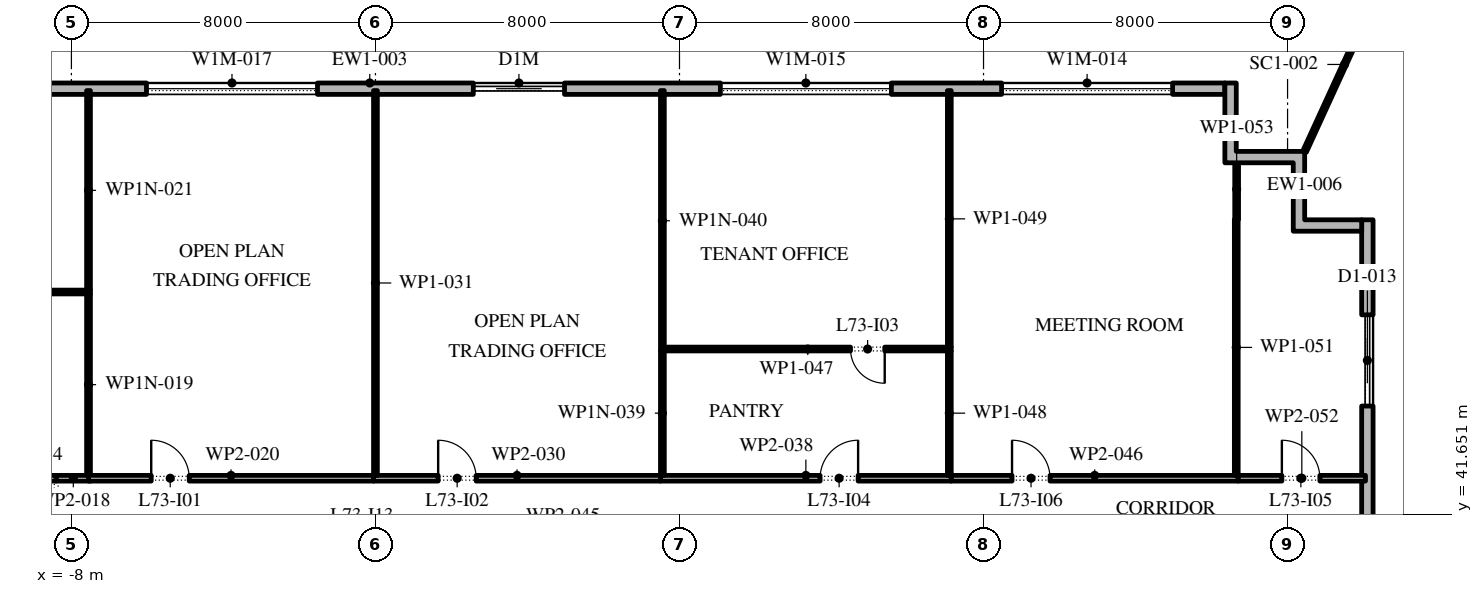
"""IFC4 building model, lengths in metres.
Left out: names, types, materials, properties, quantities, classifications, styles, units other than length and angle.
Written with IfcOpenShell. Run it as: python <this file> out.ifc"""

import sys

from ifc_helpers import new_model, si_unit, direction, frame, frame_2d, origin, place, context, subcontext, project, spatial, polyline, rectangle, outline, extrude, element, fill, save


model = new_model("IFC4")
c1 = context("Model", 3, precision=1e-05, world=origin(), true_north=direction((0.0, 1.0)))
c2 = subcontext(c1, "Body", "Model", "MODEL_VIEW")
j1 = project(units=[si_unit("LENGTHUNIT", "METRE"), si_unit("PLANEANGLEUNIT", "RADIAN")], contexts=[c1])
p1 = place(None, origin())
s1 = spatial("IfcSite", under=j1, at=p1, CompositionType="ELEMENT")
p2 = place(p1, origin())
s2 = spatial("IfcBuilding", under=s1, at=p2, CompositionType="ELEMENT")
p3 = place(p2, frame((0.0, 0.0, 334.2)))
s3 = spatial("IfcBuildingStorey", under=s2, at=p3, CompositionType="ELEMENT", Elevation=334.2)
p4 = place(p3, frame((26.1, -2.1, 0.0), z_axis=(0.0, 0.0, 1.0), x_axis=(0.0, 1.0, 0.0)))
e1 = element("IfcWall", 1, at=p4, inside=s3, PredefinedType="STANDARD", context=c2, shape_type="SweptSolid", body=[
    extrude(rectangle(XDim=51.5, YDim=0.3, at=frame_2d((25.75, 0.0))), origin(), (0.0, 0.0, 1.0), 4.0),
])
p5 = place(p4, frame((1.3, 0.0, 0.45)))
e2 = element("IfcOpeningElement", 2, at=p5, cuts=e1, PredefinedType="OPENING", context=c2, shape_type="SweptSolid", body=[
    extrude(rectangle(XDim=4.5, YDim=3.05, at=frame_2d((2.25, 1.525))), frame((0.0, 0.16, 0.0), z_axis=(0.0, -1.0, 0.0), x_axis=(1.0, 0.0, 0.0)), (0.0, 0.0, 1.0), 0.32),
])
p6 = place(p4, frame((8.55, 0.0, 0.45)))
e3 = element("IfcOpeningElement", 3, at=p6, cuts=e1, PredefinedType="OPENING", context=c2, shape_type="SweptSolid", body=[
    extrude(rectangle(XDim=4.5, YDim=3.05, at=frame_2d((2.25, 1.525))), frame((0.0, 0.16, 0.0), z_axis=(0.0, -1.0, 0.0), x_axis=(1.0, 0.0, 0.0)), (0.0, 0.0, 1.0), 0.32),
])
p7 = place(p4, frame((17.0, 0.0, 0.0)))
e4 = element("IfcOpeningElement", 4, at=p7, cuts=e1, PredefinedType="OPENING", context=c2, shape_type="SweptSolid", body=[
    extrude(rectangle(XDim=2.4, YDim=3.5, at=frame_2d((1.2, 1.75))), frame((0.0, 0.16, 0.0), z_axis=(0.0, -1.0, 0.0), x_axis=(1.0, 0.0, 0.0)), (0.0, 0.0, 1.0), 0.32),
])
p8 = place(p4, frame((23.35, 0.0, 0.45)))
e5 = element("IfcOpeningElement", 5, at=p8, cuts=e1, PredefinedType="OPENING", context=c2, shape_type="SweptSolid", body=[
    extrude(rectangle(XDim=4.5, YDim=3.05, at=frame_2d((2.25, 1.525))), frame((0.0, 0.16, 0.0), z_axis=(0.0, -1.0, 0.0), x_axis=(1.0, 0.0, 0.0)), (0.0, 0.0, 1.0), 0.32),
])
p9 = place(p4, frame((30.75, 0.0, 0.45)))
e6 = element("IfcOpeningElement", 6, at=p9, cuts=e1, PredefinedType="OPENING", context=c2, shape_type="SweptSolid", body=[
    extrude(rectangle(XDim=4.5, YDim=3.05, at=frame_2d((2.25, 1.525))), frame((0.0, 0.16, 0.0), z_axis=(0.0, -1.0, 0.0), x_axis=(1.0, 0.0, 0.0)), (0.0, 0.0, 1.0), 0.32),
])
p10 = place(p4, frame((38.15, 0.0, 0.45)))
e7 = element("IfcOpeningElement", 7, at=p10, cuts=e1, PredefinedType="OPENING", context=c2, shape_type="SweptSolid", body=[
    extrude(rectangle(XDim=4.5, YDim=3.05, at=frame_2d((2.25, 1.525))), frame((0.0, 0.16, 0.0), z_axis=(0.0, -1.0, 0.0), x_axis=(1.0, 0.0, 0.0)), (0.0, 0.0, 1.0), 0.32),
])
p11 = place(p4, frame((46.6, 0.0, 0.0)))
e8 = element("IfcOpeningElement", 8, at=p11, cuts=e1, PredefinedType="OPENING", context=c2, shape_type="SweptSolid", body=[
    extrude(rectangle(XDim=2.4, YDim=3.5, at=frame_2d((1.2, 1.75))), frame((0.0, 0.16, 0.0), z_axis=(0.0, -1.0, 0.0), x_axis=(1.0, 0.0, 0.0)), (0.0, 0.0, 1.0), 0.32),
])
p12 = place(p3, frame((22.35, 52.85, 0.0), z_axis=(0.0, 0.0, 1.0), x_axis=(-1.0, 0.0, 0.0)))
e9 = element("IfcWall", 9, at=p12, inside=s3, PredefinedType="STANDARD", context=c2, shape_type="SweptSolid", body=[
    extrude(rectangle(XDim=45.0, YDim=0.3, at=frame_2d((22.5, 0.0))), origin(), (0.0, 0.0, 1.0), 4.0),
])
p13 = place(p12, frame((1.375, 0.0, 0.45)))
e10 = element("IfcOpeningElement", 10, at=p13, cuts=e9, PredefinedType="OPENING", context=c2, shape_type="SweptSolid", body=[
    extrude(rectangle(XDim=4.5, YDim=2.575, at=frame_2d((2.25, 1.288))), frame((0.0, 0.16, 0.0), z_axis=(0.0, -1.0, 0.0), x_axis=(1.0, 0.0, 0.0)), (0.0, 0.0, 1.0), 0.32),
])
p14 = place(p12, frame((8.775, 0.0, 0.45)))
e11 = element("IfcOpeningElement", 11, at=p14, cuts=e9, PredefinedType="OPENING", context=c2, shape_type="SweptSolid", body=[
    extrude(rectangle(XDim=4.5, YDim=2.575, at=frame_2d((2.25, 1.288))), frame((0.0, 0.16, 0.0), z_axis=(0.0, -1.0, 0.0), x_axis=(1.0, 0.0, 0.0)), (0.0, 0.0, 1.0), 0.32),
])
p15 = place(p12, frame((17.375, 0.0, 0.0)))
e12 = element("IfcOpeningElement", 12, at=p15, cuts=e9, PredefinedType="OPENING", context=c2, shape_type="SweptSolid", body=[
    extrude(rectangle(XDim=2.4, YDim=3.025, at=frame_2d((1.2, 1.512))), frame((0.0, 0.16, 0.0), z_axis=(0.0, -1.0, 0.0), x_axis=(1.0, 0.0, 0.0)), (0.0, 0.0, 1.0), 0.32),
])
p16 = place(p12, frame((23.875, 0.0, 0.45)))
e13 = element("IfcOpeningElement", 13, at=p16, cuts=e9, PredefinedType="OPENING", context=c2, shape_type="SweptSolid", body=[
    extrude(rectangle(XDim=4.5, YDim=2.575, at=frame_2d((2.25, 1.288))), frame((0.0, 0.16, 0.0), z_axis=(0.0, -1.0, 0.0), x_axis=(1.0, 0.0, 0.0)), (0.0, 0.0, 1.0), 0.32),
])
p17 = place(p12, frame((31.425, 0.0, 0.45)))
e14 = element("IfcOpeningElement", 14, at=p17, cuts=e9, PredefinedType="OPENING", context=c2, shape_type="SweptSolid", body=[
    extrude(rectangle(XDim=4.5, YDim=2.575, at=frame_2d((2.25, 1.288))), frame((0.0, 0.16, 0.0), z_axis=(0.0, -1.0, 0.0), x_axis=(1.0, 0.0, 0.0)), (0.0, 0.0, 1.0), 0.32),
])
p18 = place(p12, frame((38.975, 0.0, 0.45)))
e15 = element("IfcOpeningElement", 15, at=p18, cuts=e9, PredefinedType="OPENING", context=c2, shape_type="SweptSolid", body=[
    extrude(rectangle(XDim=4.5, YDim=2.575, at=frame_2d((2.25, 1.288))), frame((0.0, 0.16, 0.0), z_axis=(0.0, -1.0, 0.0), x_axis=(1.0, 0.0, 0.0)), (0.0, 0.0, 1.0), 0.32),
])
p19 = place(p3, origin())
e16 = element("IfcWall", 16, at=p19, inside=s3, PredefinedType="STANDARD", context=c2, shape_type="SweptSolid", body=[
    extrude(outline(polyline([(24.15, 50.9), (22.35, 50.9), (22.35, 53.0), (22.65, 53.0), (22.65, 51.2), (24.45, 51.2), (24.45, 49.4), (25.95, 49.4), (25.95, 49.1), (24.15, 49.1), (24.15, 50.9)])), origin(), (0.0, 0.0, 1.0), 4.0),
])
p20 = place(p3, frame((24.45, 51.2, -0.05), z_axis=(0.0, 0.0, 1.0), x_axis=(0.41666974254, 0.909057933056, 0.0)))
e17 = element("IfcWall", 17, at=p20, inside=s3, PredefinedType="STANDARD", context=c2, shape_type="SweptSolid", body=[
    extrude(rectangle(XDim=5.033, YDim=0.1, at=frame_2d((2.517, 0.0))), origin(), (0.0, 0.0, 1.0), 4.05),
])
p21 = place(p3, frame((-15.05, 47.5, 0.0), z_axis=(0.0, 0.0, 1.0), x_axis=(1.0, 0.0, 0.0)))
e18 = element("IfcWall", 18, at=p21, inside=s3, PredefinedType="PARTITIONING", context=c2, shape_type="SweptSolid", body=[
    extrude(rectangle(XDim=7.55, YDim=0.1, at=frame_2d((3.775, 0.0))), origin(), (0.0, 0.0, 1.0), 4.0),
])
p22 = place(p21, frame((4.9, 0.0, 0.0)))
e19 = element("IfcOpeningElement", 19, at=p22, cuts=e18, PredefinedType="OPENING", context=c2, shape_type="SweptSolid", body=[
    extrude(rectangle(XDim=0.9, YDim=2.1, at=frame_2d((0.45, 1.05))), frame((0.0, 0.06, 0.0), z_axis=(0.0, -1.0, 0.0), x_axis=(1.0, 0.0, 0.0)), (0.0, 0.0, 1.0), 0.12),
])
p23 = place(p3, frame((-10.0, 42.6, 0.0), z_axis=(0.0, 0.0, 1.0), x_axis=(1.0, 0.0, 0.0)))
e20 = element("IfcWall", 20, at=p23, inside=s3, PredefinedType="PARTITIONING", context=c2, shape_type="SweptSolid", body=[
    extrude(rectangle(XDim=1.6, YDim=0.15, at=frame_2d((0.8, 0.0))), origin(), (0.0, 0.0, 1.0), 4.0),
])
p24 = place(p3, frame((-8.4, 42.6, 0.0), z_axis=(0.0, 0.0, 1.0), x_axis=(1.0, 0.0, 0.0)))
e21 = element("IfcWall", 21, at=p24, inside=s3, PredefinedType="PARTITIONING", context=c2, shape_type="SweptSolid", body=[
    extrude(rectangle(XDim=0.9, YDim=0.15, at=frame_2d((0.45, 0.0))), origin(), (0.0, 0.0, 1.0), 4.0),
])
p25 = place(p3, frame((-7.55, 42.675, 0.0), z_axis=(0.0, 0.0, 1.0), x_axis=(0.0, 1.0, 0.0)))
e22 = element("IfcWall", 22, at=p25, inside=s3, PredefinedType="PARTITIONING", context=c2, shape_type="SweptSolid", body=[
    extrude(rectangle(XDim=4.775, YDim=0.1, at=frame_2d((2.387, 0.0))), origin(), (0.0, 0.0, 1.0), 3.164),
])
p26 = place(p3, frame((-7.55, 42.6, 0.0), z_axis=(0.0, 0.0, 1.0), x_axis=(1.0, 0.0, 0.0)))
e23 = element("IfcWall", 23, at=p26, inside=s3, PredefinedType="PARTITIONING", context=c2, shape_type="SweptSolid", body=[
    extrude(rectangle(XDim=7.5, YDim=0.15, at=frame_2d((3.75, 0.0))), origin(), (0.0, 0.0, 1.0), 4.0),
])
p27 = place(p26, frame((1.65, 0.0, 0.0)))
e24 = element("IfcOpeningElement", 24, at=p27, cuts=e23, PredefinedType="OPENING", context=c2, shape_type="SweptSolid", body=[
    extrude(rectangle(XDim=1.0, YDim=2.1, at=frame_2d((0.5, 1.05))), frame((0.0, 0.085, 0.0), z_axis=(0.0, -1.0, 0.0), x_axis=(1.0, 0.0, 0.0)), (0.0, 0.0, 1.0), 0.17),
])
p28 = place(p3, frame((-7.55, 47.55, 0.0), z_axis=(0.0, 0.0, 1.0), x_axis=(0.0, 1.0, 0.0)))
e25 = element("IfcWall", 25, at=p28, inside=s3, PredefinedType="PARTITIONING", context=c2, shape_type="SweptSolid", body=[
    extrude(rectangle(XDim=5.25, YDim=0.1, at=frame_2d((2.625, 0.0))), origin(), (0.0, 0.0, 1.0), 3.164),
])
p29 = place(p3, frame((-0.05, 42.6, 0.0), z_axis=(0.0, 0.0, 1.0), x_axis=(1.0, 0.0, 0.0)))
e26 = element("IfcWall", 26, at=p29, inside=s3, PredefinedType="PARTITIONING", context=c2, shape_type="SweptSolid", body=[
    extrude(rectangle(XDim=7.55, YDim=0.15, at=frame_2d((3.775, 0.0))), origin(), (0.0, 0.0, 1.0), 4.0),
])
p30 = place(p29, frame((1.7, 0.0, 0.0)))
e27 = element("IfcOpeningElement", 27, at=p30, cuts=e26, PredefinedType="OPENING", context=c2, shape_type="SweptSolid", body=[
    extrude(rectangle(XDim=1.0, YDim=2.1, at=frame_2d((0.5, 1.05))), frame((0.0, 0.085, 0.0), z_axis=(0.0, -1.0, 0.0), x_axis=(1.0, 0.0, 0.0)), (0.0, 0.0, 1.0), 0.17),
])
p31 = place(p3, frame((0.0, 52.8, 0.0), z_axis=(0.0, 0.0, 1.0), x_axis=(0.0, -1.0, 0.0)))
e28 = element("IfcWall", 28, at=p31, inside=s3, PredefinedType="PARTITIONING", context=c2, shape_type="SweptSolid", body=[
    extrude(rectangle(XDim=10.125, YDim=0.1, at=frame_2d((5.062, 0.0))), origin(), (0.0, 0.0, 1.0), 4.0),
])
p32 = place(p3, frame((7.5, 42.6, 0.0), z_axis=(0.0, 0.0, 1.0), x_axis=(1.0, 0.0, 0.0)))
e29 = element("IfcWall", 29, at=p32, inside=s3, PredefinedType="PARTITIONING", context=c2, shape_type="SweptSolid", body=[
    extrude(rectangle(XDim=7.65, YDim=0.15, at=frame_2d((3.825, 0.0))), origin(), (0.0, 0.0, 1.0), 4.0),
])
p33 = place(p32, frame((4.2, 0.0, 0.0)))
e30 = element("IfcOpeningElement", 30, at=p33, cuts=e29, PredefinedType="OPENING", context=c2, shape_type="SweptSolid", body=[
    extrude(rectangle(XDim=1.0, YDim=2.1, at=frame_2d((0.5, 1.05))), frame((0.0, 0.085, 0.0), z_axis=(0.0, -1.0, 0.0), x_axis=(1.0, 0.0, 0.0)), (0.0, 0.0, 1.0), 0.17),
])
p34 = place(p3, frame((7.55, 45.95, 0.0), z_axis=(0.0, 0.0, 1.0), x_axis=(0.0, -1.0, 0.0)))
e31 = element("IfcWall", 31, at=p34, inside=s3, PredefinedType="PARTITIONING", context=c2, shape_type="SweptSolid", body=[
    extrude(rectangle(XDim=3.275, YDim=0.1, at=frame_2d((1.637, 0.0))), origin(), (0.0, 0.0, 1.0), 3.164),
])
p35 = place(p3, frame((7.55, 52.8, 0.0), z_axis=(0.0, 0.0, 1.0), x_axis=(0.0, -1.0, 0.0)))
e32 = element("IfcWall", 32, at=p35, inside=s3, PredefinedType="PARTITIONING", context=c2, shape_type="SweptSolid", body=[
    extrude(rectangle(XDim=6.85, YDim=0.1, at=frame_2d((3.425, 0.0))), origin(), (0.0, 0.0, 1.0), 3.164),
])
p36 = place(p3, frame((15.15, 42.6, 0.0), z_axis=(0.0, 0.0, 1.0), x_axis=(1.0, 0.0, 0.0)))
e33 = element("IfcWall", 33, at=p36, inside=s3, PredefinedType="PARTITIONING", context=c2, shape_type="SweptSolid", body=[
    extrude(rectangle(XDim=7.55, YDim=0.15, at=frame_2d((3.775, 0.0))), origin(), (0.0, 0.0, 1.0), 4.0),
])
p37 = place(p36, frame((1.6, 0.0, 0.0)))
e34 = element("IfcOpeningElement", 34, at=p37, cuts=e33, PredefinedType="OPENING", context=c2, shape_type="SweptSolid", body=[
    extrude(rectangle(XDim=1.0, YDim=2.1, at=frame_2d((0.5, 1.05))), frame((0.0, 0.085, 0.0), z_axis=(0.0, -1.0, 0.0), x_axis=(1.0, 0.0, 0.0)), (0.0, 0.0, 1.0), 0.17),
])
p38 = place(p3, frame((15.15, 46.0, 0.0), z_axis=(0.0, 0.0, 1.0), x_axis=(-1.0, 0.0, 0.0)))
e35 = element("IfcWall", 35, at=p38, inside=s3, PredefinedType="PARTITIONING", context=c2, shape_type="SweptSolid", body=[
    extrude(rectangle(XDim=7.55, YDim=0.1, at=frame_2d((3.775, 0.0))), origin(), (0.0, 0.0, 1.0), 4.0),
])
p39 = place(p38, frame((1.75, 0.0, 0.0)))
e36 = element("IfcOpeningElement", 36, at=p39, cuts=e35, PredefinedType="OPENING", context=c2, shape_type="SweptSolid", body=[
    extrude(rectangle(XDim=0.9, YDim=2.1, at=frame_2d((0.45, 1.05))), frame((0.0, 0.06, 0.0), z_axis=(0.0, -1.0, 0.0), x_axis=(1.0, 0.0, 0.0)), (0.0, 0.0, 1.0), 0.12),
])
p40 = place(p3, frame((15.1, 45.95, 0.0), z_axis=(0.0, 0.0, 1.0), x_axis=(0.0, -1.0, 0.0)))
e37 = element("IfcWall", 37, at=p40, inside=s3, PredefinedType="PARTITIONING", context=c2, shape_type="SweptSolid", body=[
    extrude(rectangle(XDim=3.275, YDim=0.1, at=frame_2d((1.637, 0.0))), origin(), (0.0, 0.0, 1.0), 4.0),
])
p41 = place(p3, frame((15.1, 52.8, 0.0), z_axis=(0.0, 0.0, 1.0), x_axis=(0.0, -1.0, 0.0)))
e38 = element("IfcWall", 38, at=p41, inside=s3, PredefinedType="PARTITIONING", context=c2, shape_type="SweptSolid", body=[
    extrude(rectangle(XDim=6.75, YDim=0.1, at=frame_2d((3.375, 0.0))), origin(), (0.0, 0.0, 1.0), 4.0),
])
p42 = place(p3, frame((22.65, 42.675, 0.0), z_axis=(0.0, 0.0, 1.0), x_axis=(0.0, 1.0, 0.0)))
e39 = element("IfcWall", 39, at=p42, inside=s3, PredefinedType="PARTITIONING", context=c2, shape_type="SweptSolid", body=[
    extrude(rectangle(XDim=6.735, YDim=0.1, at=frame_2d((3.367, 0.0))), origin(), (0.0, 0.0, 1.0), 4.0),
])
p43 = place(p3, frame((22.7, 42.6, 0.0), z_axis=(0.0, 0.0, 1.0), x_axis=(1.0, 0.0, 0.0)))
e40 = element("IfcWall", 40, at=p43, inside=s3, PredefinedType="PARTITIONING", context=c2, shape_type="SweptSolid", body=[
    extrude(rectangle(XDim=3.35, YDim=0.15, at=frame_2d((1.675, 0.0))), origin(), (0.0, 0.0, 1.0), 4.0),
])
p44 = place(p43, frame((1.15, 0.0, 0.0)))
e41 = element("IfcOpeningElement", 41, at=p44, cuts=e40, PredefinedType="OPENING", context=c2, shape_type="SweptSolid", body=[
    extrude(rectangle(XDim=1.0, YDim=2.1, at=frame_2d((0.5, 1.05))), frame((0.0, 0.085, 0.0), z_axis=(0.0, -1.0, 0.0), x_axis=(1.0, 0.0, 0.0)), (0.0, 0.0, 1.0), 0.17),
])
p45 = place(p3, frame((22.66, 49.41, 0.0), z_axis=(0.0, 0.0, 1.0), x_axis=(0.0, 1.0, 0.0)))
e42 = element("IfcWall", 42, at=p45, inside=s3, PredefinedType="PARTITIONING", context=c2, shape_type="SweptSolid", body=[
    extrude(rectangle(XDim=1.59, YDim=0.1, at=frame_2d((0.795, 0.0))), origin(), (0.0, 0.0, 1.0), 4.0),
])
p46 = place(p11, origin())
e43 = element("IfcDoor", 43, at=p46, inside=s3, OperationType="DOUBLE_DOOR_SLIDING", PredefinedType="DOOR", context=c2, shape_type="SweptSolid", body=[
    extrude(rectangle(XDim=2.4, YDim=3.5, at=frame_2d((1.2, 1.75))), frame((0.0, 0.025, 0.0), z_axis=(0.0, -1.0, 0.0), x_axis=(1.0, 0.0, 0.0)), (0.0, 0.0, 1.0), 0.05),
])
fill(e8, e43)
p47 = place(p13, origin())
e44 = element("IfcWindow", 44, at=p47, inside=s3, PartitioningType="DOUBLE_PANEL_VERTICAL", PredefinedType="WINDOW", context=c2, shape_type="SweptSolid", body=[
    extrude(rectangle(XDim=4.5, YDim=2.575, at=frame_2d((2.25, 1.288))), frame((0.0, 0.03, 0.0), z_axis=(0.0, -1.0, 0.0), x_axis=(1.0, 0.0, 0.0)), (0.0, 0.0, 1.0), 0.06),
])
fill(e10, e44)
p48 = place(p14, origin())
e45 = element("IfcWindow", 45, at=p48, inside=s3, PartitioningType="DOUBLE_PANEL_VERTICAL", PredefinedType="WINDOW", context=c2, shape_type="SweptSolid", body=[
    extrude(rectangle(XDim=4.5, YDim=2.575, at=frame_2d((2.25, 1.288))), frame((0.0, 0.03, 0.0), z_axis=(0.0, -1.0, 0.0), x_axis=(1.0, 0.0, 0.0)), (0.0, 0.0, 1.0), 0.06),
])
fill(e11, e45)
p49 = place(p15, origin())
e46 = element("IfcDoor", 46, at=p49, inside=s3, OperationType="DOUBLE_DOOR_SLIDING", PredefinedType="DOOR", context=c2, shape_type="SweptSolid", body=[
    extrude(rectangle(XDim=2.4, YDim=3.025, at=frame_2d((1.2, 1.512))), frame((0.0, 0.025, 0.0), z_axis=(0.0, -1.0, 0.0), x_axis=(1.0, 0.0, 0.0)), (0.0, 0.0, 1.0), 0.05),
])
fill(e12, e46)
p50 = place(p16, origin())
e47 = element("IfcWindow", 47, at=p50, inside=s3, PartitioningType="DOUBLE_PANEL_VERTICAL", PredefinedType="WINDOW", context=c2, shape_type="SweptSolid", body=[
    extrude(rectangle(XDim=4.5, YDim=2.575, at=frame_2d((2.25, 1.288))), frame((0.0, 0.03, 0.0), z_axis=(0.0, -1.0, 0.0), x_axis=(1.0, 0.0, 0.0)), (0.0, 0.0, 1.0), 0.06),
])
fill(e13, e47)
p51 = place(p27, origin())
e48 = element("IfcDoor", 48, at=p51, inside=s3, OperationType="SINGLE_SWING_RIGHT", PredefinedType="DOOR", context=c2, shape_type="SweptSolid", body=[
    extrude(rectangle(XDim=1.0, YDim=2.1, at=frame_2d((0.5, 1.05))), frame((0.0, 0.025, 0.0), z_axis=(0.0, -1.0, 0.0), x_axis=(1.0, 0.0, 0.0)), (0.0, 0.0, 1.0), 0.05),
])
fill(e24, e48)
p52 = place(p30, origin())
e49 = element("IfcDoor", 49, at=p52, inside=s3, OperationType="SINGLE_SWING_RIGHT", PredefinedType="DOOR", context=c2, shape_type="SweptSolid", body=[
    extrude(rectangle(XDim=1.0, YDim=2.1, at=frame_2d((0.5, 1.05))), frame((0.0, 0.025, 0.0), z_axis=(0.0, -1.0, 0.0), x_axis=(1.0, 0.0, 0.0)), (0.0, 0.0, 1.0), 0.05),
])
fill(e27, e49)
p53 = place(p39, origin())
e50 = element("IfcDoor", 50, at=p53, inside=s3, OperationType="SINGLE_SWING_RIGHT", PredefinedType="DOOR", context=c2, shape_type="SweptSolid", body=[
    extrude(rectangle(XDim=0.9, YDim=2.1, at=frame_2d((0.45, 1.05))), frame((0.0, 0.025, 0.0), z_axis=(0.0, -1.0, 0.0), x_axis=(1.0, 0.0, 0.0)), (0.0, 0.0, 1.0), 0.05),
])
fill(e36, e50)
p54 = place(p33, origin())
e51 = element("IfcDoor", 51, at=p54, inside=s3, OperationType="SINGLE_SWING_LEFT", PredefinedType="DOOR", context=c2, shape_type="SweptSolid", body=[
    extrude(rectangle(XDim=1.0, YDim=2.1, at=frame_2d((0.5, 1.05))), frame((0.0, 0.025, 0.0), z_axis=(0.0, -1.0, 0.0), x_axis=(1.0, 0.0, 0.0)), (0.0, 0.0, 1.0), 0.05),
])
fill(e30, e51)
p55 = place(p44, origin())
e52 = element("IfcDoor", 52, at=p55, inside=s3, OperationType="SINGLE_SWING_RIGHT", PredefinedType="DOOR", context=c2, shape_type="SweptSolid", body=[
    extrude(rectangle(XDim=1.0, YDim=2.1, at=frame_2d((0.5, 1.05))), frame((0.0, 0.025, 0.0), z_axis=(0.0, -1.0, 0.0), x_axis=(1.0, 0.0, 0.0)), (0.0, 0.0, 1.0), 0.05),
])
fill(e41, e52)
p56 = place(p37, origin())
e53 = element("IfcDoor", 53, at=p56, inside=s3, OperationType="SINGLE_SWING_RIGHT", PredefinedType="DOOR", context=c2, shape_type="SweptSolid", body=[
    extrude(rectangle(XDim=1.0, YDim=2.1, at=frame_2d((0.5, 1.05))), frame((0.0, 0.025, 0.0), z_axis=(0.0, -1.0, 0.0), x_axis=(1.0, 0.0, 0.0)), (0.0, 0.0, 1.0), 0.05),
])
fill(e34, e53)
save(model, sys.argv[1])
